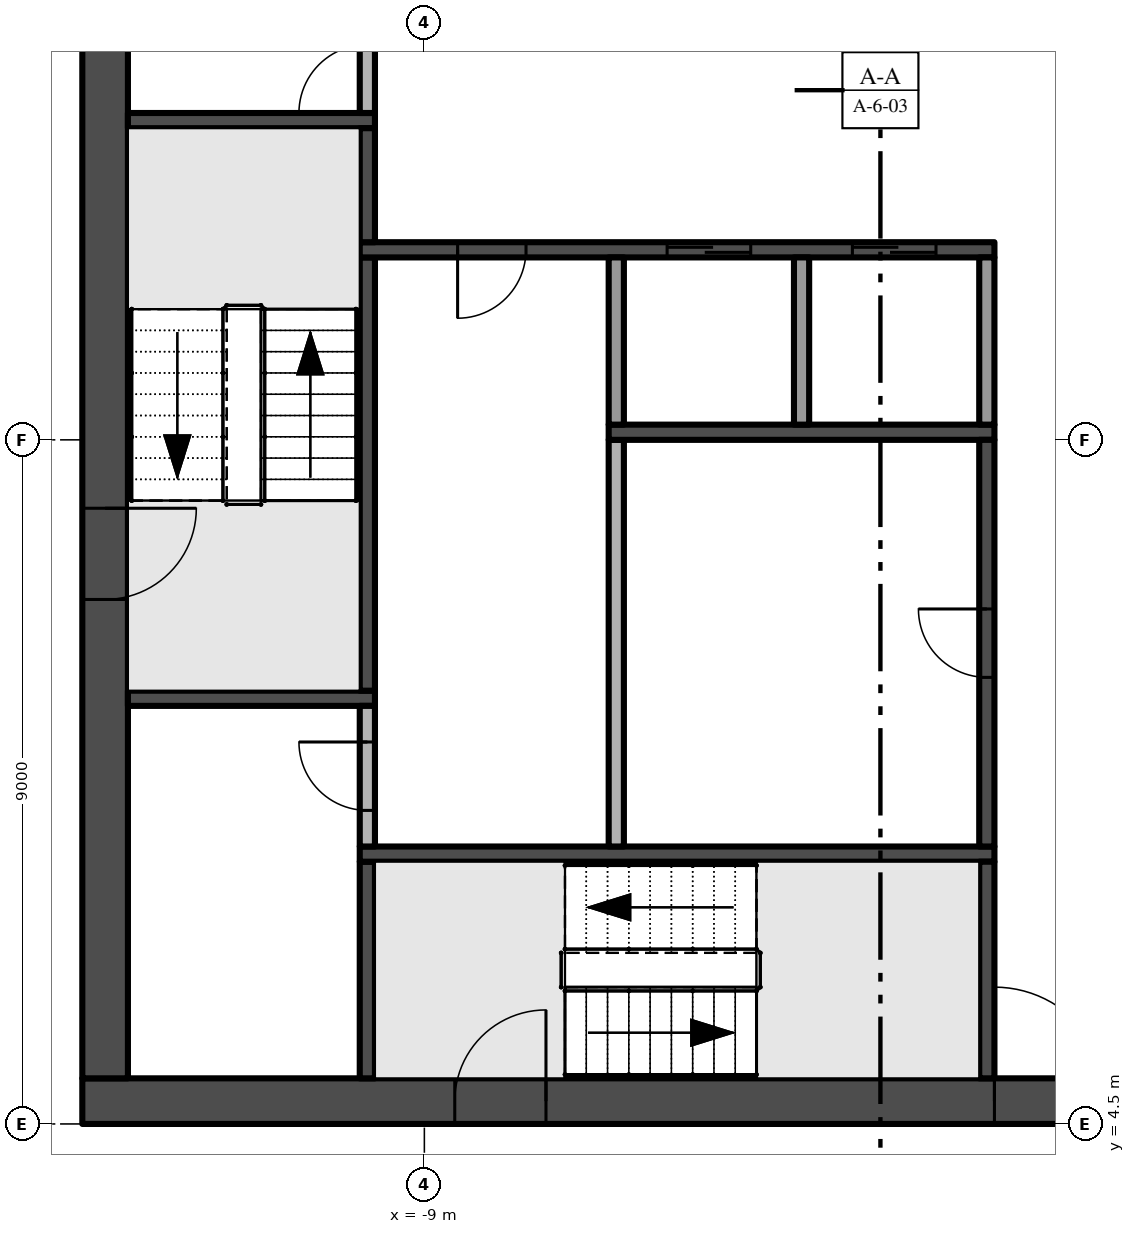
"""IFC4 building model, lengths in metres.
Left out: names, types, materials, properties, quantities, classifications, styles, units other than length and angle.
Written with IfcOpenShell. Run it as: python <this file> out.ifc"""

import sys

from ifc_helpers import new_model, si_unit, direction, frame, frame_2d, origin, place, context, subcontext, project, spatial, rectangle, extrude, element, fill, save


model = new_model("IFC4")
c1 = context("Model", 3, precision=1e-05, world=origin(), true_north=direction((0.0, 1.0)))
c2 = subcontext(c1, "Body", "Model", "MODEL_VIEW")
j1 = project(units=[si_unit("LENGTHUNIT", "METRE"), si_unit("PLANEANGLEUNIT", "RADIAN")], contexts=[c1])
p1 = place(None, origin())
s1 = spatial("IfcSite", under=j1, at=p1, CompositionType="ELEMENT")
p2 = place(p1, origin())
s2 = spatial("IfcBuilding", under=s1, at=p2, CompositionType="ELEMENT")
p3 = place(p2, frame((0.0, 0.0, 297.4)))
s3 = spatial("IfcBuildingStorey", under=s2, at=p3, CompositionType="ELEMENT", Elevation=297.4)
p4 = place(p3, frame((-13.5, 4.8, -0.3), z_axis=(0.0, 0.0, 1.0), x_axis=(1.0, 0.0, 0.0)))
e1 = element("IfcWall", 1, at=p4, inside=s3, PredefinedType="SHEAR", context=c2, shape_type="SweptSolid", body=[
    extrude(rectangle(XDim=27.0, YDim=0.6, at=frame_2d((13.5, 0.0))), origin(), (0.0, 0.0, 1.0), 5.95),
])
p5 = place(p4, frame((12.0, 0.0, 0.3)))
e2 = element("IfcOpeningElement", 2, at=p5, cuts=e1, PredefinedType="OPENING", context=c2, shape_type="SweptSolid", body=[
    extrude(rectangle(XDim=3.0, YDim=2.4, at=frame_2d((1.5, 1.2))), frame((0.0, 0.31, 0.0), z_axis=(0.0, -1.0, 0.0), x_axis=(1.0, 0.0, 0.0)), (0.0, 0.0, 1.0), 0.62),
])
p6 = place(p4, frame((4.9, 0.0, 0.3)))
e3 = element("IfcOpeningElement", 3, at=p6, cuts=e1, PredefinedType="OPENING", context=c2, shape_type="SweptSolid", body=[
    extrude(rectangle(XDim=1.2, YDim=2.2, at=frame_2d((0.6, 1.1))), frame((0.0, 0.31, 0.0), z_axis=(0.0, -1.0, 0.0), x_axis=(1.0, 0.0, 0.0)), (0.0, 0.0, 1.0), 0.62),
])
p7 = place(p4, frame((20.75, 0.0, 0.3)))
e4 = element("IfcOpeningElement", 4, at=p7, cuts=e1, PredefinedType="OPENING", context=c2, shape_type="SweptSolid", body=[
    extrude(rectangle(XDim=1.5, YDim=2.2, at=frame_2d((0.75, 1.1))), frame((0.0, 0.31, 0.0), z_axis=(0.0, -1.0, 0.0), x_axis=(1.0, 0.0, 0.0)), (0.0, 0.0, 1.0), 0.62),
])
p8 = place(p4, frame((17.4, 0.0, 0.3)))
e5 = element("IfcOpeningElement", 5, at=p8, cuts=e1, PredefinedType="OPENING", context=c2, shape_type="SweptSolid", body=[
    extrude(rectangle(XDim=1.2, YDim=2.2, at=frame_2d((0.6, 1.1))), frame((0.0, 0.31, 0.0), z_axis=(0.0, -1.0, 0.0), x_axis=(1.0, 0.0, 0.0)), (0.0, 0.0, 1.0), 0.62),
])
p9 = place(p3, frame((-13.2, 21.9, -0.3), z_axis=(0.0, 0.0, 1.0), x_axis=(0.0, -1.0, 0.0)))
e6 = element("IfcWall", 6, at=p9, inside=s3, PredefinedType="SHEAR", context=c2, shape_type="SweptSolid", body=[
    extrude(rectangle(XDim=16.8, YDim=0.6, at=frame_2d((8.4, 0.0))), origin(), (0.0, 0.0, 1.0), 5.95),
])
p10 = place(p9, frame((9.3, 0.0, 0.3)))
e7 = element("IfcOpeningElement", 7, at=p10, cuts=e6, PredefinedType="OPENING", context=c2, shape_type="SweptSolid", body=[
    extrude(rectangle(XDim=1.2, YDim=2.2, at=frame_2d((0.6, 1.1))), frame((0.0, 0.31, 0.0), z_axis=(0.0, -1.0, 0.0), x_axis=(1.0, 0.0, 0.0)), (0.0, 0.0, 1.0), 0.62),
])
for number, where, z_axis, x_axis in (
    (8, (-12.9, 10.1, 0.0), (0.0, 0.0, 1.0), (1.0, 0.0, 0.0)),
    (9, (-12.9, 17.7, 0.0), (0.0, 0.0, 1.0), (1.0, 0.0, 0.0)),
):
    element("IfcWall", number, at=place(p3, frame(where, z_axis=z_axis, x_axis=x_axis)), inside=s3, PredefinedType="SHEAR", context=c2, shape_type="SweptSolid", body=[
        extrude(rectangle(XDim=3.25, YDim=0.2, at=frame_2d((1.625, 0.0))), origin(), (0.0, 0.0, 1.0), 5.65),
    ])
p11 = place(p3, frame((-9.75, 5.1, 0.0), z_axis=(0.0, 0.0, 1.0), x_axis=(0.0, 1.0, 0.0)))
e10 = element("IfcWall", 10, at=p11, inside=s3, PredefinedType="SHEAR", context=c2, shape_type="SweptSolid", body=[
    extrude(rectangle(XDim=2.85, YDim=0.2, at=frame_2d((1.425, 0.0))), origin(), (0.0, 0.0, 1.0), 5.65),
])
p12 = place(p3, frame((-9.85, 8.05, 0.0), z_axis=(0.0, 0.0, 1.0), x_axis=(1.0, 0.0, 0.0)))
e11 = element("IfcWall", 11, at=p12, inside=s3, PredefinedType="SHEAR", context=c2, shape_type="SweptSolid", body=[
    extrude(rectangle(XDim=8.35, YDim=0.2, at=frame_2d((4.175, 0.0))), origin(), (0.0, 0.0, 1.0), 5.65),
])
p13 = place(p3, frame((-9.75, 8.15, 0.0), z_axis=(0.0, 0.0, 1.0), x_axis=(0.0, 1.0, 0.0)))
e12 = element("IfcWall", 12, at=p13, inside=s3, PredefinedType="PARTITIONING", context=c2, shape_type="SweptSolid", body=[
    extrude(rectangle(XDim=1.85, YDim=0.2, at=frame_2d((0.925, 0.0))), origin(), (0.0, 0.0, 1.0), 5.65),
])
p14 = place(p13, frame((0.475, 0.0, 0.0)))
e13 = element("IfcOpeningElement", 13, at=p14, cuts=e12, PredefinedType="OPENING", context=c2, shape_type="SweptSolid", body=[
    extrude(rectangle(XDim=0.9, YDim=2.1, at=frame_2d((0.45, 1.05))), frame((0.0, 0.11, 0.0), z_axis=(0.0, -1.0, 0.0), x_axis=(1.0, 0.0, 0.0)), (0.0, 0.0, 1.0), 0.22),
])
p15 = place(p3, frame((-9.75, 10.2, 0.0), z_axis=(0.0, 0.0, 1.0), x_axis=(0.0, 1.0, 0.0)))
e14 = element("IfcWall", 14, at=p15, inside=s3, PredefinedType="SHEAR", context=c2, shape_type="SweptSolid", body=[
    extrude(rectangle(XDim=5.7, YDim=0.2, at=frame_2d((2.85, 0.0))), origin(), (0.0, 0.0, 1.0), 5.65),
])
p16 = place(p3, frame((-1.5, 16.0, 0.0), z_axis=(0.0, 0.0, 1.0), x_axis=(-1.0, 0.0, 0.0)))
e15 = element("IfcWall", 15, at=p16, inside=s3, PredefinedType="SHEAR", context=c2, shape_type="SweptSolid", body=[
    extrude(rectangle(XDim=8.35, YDim=0.2, at=frame_2d((4.175, 0.0))), origin(), (0.0, 0.0, 1.0), 5.65),
])
p17 = place(p16, frame((3.206, 0.0, 0.0)))
e16 = element("IfcOpeningElement", 16, at=p17, cuts=e15, PredefinedType="OPENING", context=c2, shape_type="SweptSolid", body=[
    extrude(rectangle(XDim=1.1, YDim=2.1, at=frame_2d((0.55, 1.05))), frame((0.0, 0.11, 0.0), z_axis=(0.0, -1.0, 0.0), x_axis=(1.0, 0.0, 0.0)), (0.0, 0.0, 1.0), 0.22),
])
p18 = place(p16, frame((0.769, 0.0, 0.0)))
e17 = element("IfcOpeningElement", 17, at=p18, cuts=e15, PredefinedType="OPENING", context=c2, shape_type="SweptSolid", body=[
    extrude(rectangle(XDim=1.1, YDim=2.1, at=frame_2d((0.55, 1.05))), frame((0.0, 0.11, 0.0), z_axis=(0.0, -1.0, 0.0), x_axis=(1.0, 0.0, 0.0)), (0.0, 0.0, 1.0), 0.22),
])
p19 = place(p16, frame((6.162, 0.0, 0.0)))
e18 = element("IfcOpeningElement", 18, at=p19, cuts=e15, PredefinedType="OPENING", context=c2, shape_type="SweptSolid", body=[
    extrude(rectangle(XDim=0.9, YDim=2.1, at=frame_2d((0.45, 1.05))), frame((0.0, 0.11, 0.0), z_axis=(0.0, -1.0, 0.0), x_axis=(1.0, 0.0, 0.0)), (0.0, 0.0, 1.0), 0.22),
])
p20 = place(p3, frame((-9.75, 16.1, 0.0), z_axis=(0.0, 0.0, 1.0), x_axis=(0.0, 1.0, 0.0)))
e19 = element("IfcWall", 19, at=p20, inside=s3, PredefinedType="SHEAR", context=c2, shape_type="SweptSolid", body=[
    extrude(rectangle(XDim=1.5, YDim=0.2, at=frame_2d((0.75, 0.0))), origin(), (0.0, 0.0, 1.0), 5.65),
])
p21 = place(p3, frame((-9.75, 17.8, 0.0), z_axis=(0.0, 0.0, 1.0), x_axis=(0.0, 1.0, 0.0)))
e20 = element("IfcWall", 20, at=p21, inside=s3, PredefinedType="PARTITIONING", context=c2, shape_type="SweptSolid", body=[
    extrude(rectangle(XDim=1.4, YDim=0.2, at=frame_2d((0.7, 0.0))), origin(), (0.0, 0.0, 1.0), 5.65),
])
p22 = place(p21, origin())
e21 = element("IfcOpeningElement", 21, at=p22, cuts=e20, PredefinedType="OPENING", context=c2, shape_type="SweptSolid", body=[
    extrude(rectangle(XDim=0.9, YDim=2.1, at=frame_2d((0.45, 1.05))), frame((0.0, 0.11, 0.0), z_axis=(0.0, -1.0, 0.0), x_axis=(1.0, 0.0, 0.0)), (0.0, 0.0, 1.0), 0.22),
])
p23 = place(p3, frame((-6.475, 8.15, 0.0), z_axis=(0.0, 0.0, 1.0), x_axis=(0.0, 1.0, 0.0)))
e22 = element("IfcWall", 22, at=p23, inside=s3, PredefinedType="PARTITIONING", context=c2, shape_type="SweptSolid", body=[
    extrude(rectangle(XDim=5.35, YDim=0.2, at=frame_2d((2.675, 0.0))), origin(), (0.0, 0.0, 1.0), 5.65),
])
p24 = place(p3, frame((-6.575, 13.6, 0.0), z_axis=(0.0, 0.0, 1.0), x_axis=(1.0, 0.0, 0.0)))
e23 = element("IfcWall", 23, at=p24, inside=s3, PredefinedType="SHEAR", context=c2, shape_type="SweptSolid", body=[
    extrude(rectangle(XDim=5.075, YDim=0.2, at=frame_2d((2.538, 0.0))), origin(), (0.0, 0.0, 1.0), 5.65),
])
for number, where, z_axis, x_axis in (
    (24, (-6.475, 13.7, 0.0), (0.0, 0.0, 1.0), (0.0, 1.0, 0.0)),
    (25, (-4.037, 13.7, 0.0), (0.0, 0.0, 1.0), (0.0, 1.0, 0.0)),
):
    element("IfcWall", number, at=place(p3, frame(where, z_axis=z_axis, x_axis=x_axis)), inside=s3, PredefinedType="PARTITIONING", context=c2, shape_type="SweptSolid", body=[
        extrude(rectangle(XDim=2.2, YDim=0.2, at=frame_2d((1.1, 0.0))), origin(), (0.0, 0.0, 1.0), 5.65),
    ])
p25 = place(p3, frame((-1.6, 5.1, 0.0), z_axis=(0.0, 0.0, 1.0), x_axis=(0.0, 1.0, 0.0)))
e26 = element("IfcWall", 26, at=p25, inside=s3, PredefinedType="SHEAR", context=c2, shape_type="SweptSolid", body=[
    extrude(rectangle(XDim=2.85, YDim=0.2, at=frame_2d((1.425, 0.0))), origin(), (0.0, 0.0, 1.0), 5.65),
])
p26 = place(p3, frame((-1.6, 8.15, 0.0), z_axis=(0.0, 0.0, 1.0), x_axis=(0.0, 1.0, 0.0)))
e27 = element("IfcWall", 27, at=p26, inside=s3, PredefinedType="SHEAR", context=c2, shape_type="SweptSolid", body=[
    extrude(rectangle(XDim=5.35, YDim=0.2, at=frame_2d((2.675, 0.0))), origin(), (0.0, 0.0, 1.0), 5.65),
])
p27 = place(p26, frame((2.225, 0.0, 0.0)))
e28 = element("IfcOpeningElement", 28, at=p27, cuts=e27, PredefinedType="OPENING", context=c2, shape_type="SweptSolid", body=[
    extrude(rectangle(XDim=0.9, YDim=2.1, at=frame_2d((0.45, 1.05))), frame((0.0, 0.11, 0.0), z_axis=(0.0, -1.0, 0.0), x_axis=(1.0, 0.0, 0.0)), (0.0, 0.0, 1.0), 0.22),
])
p28 = place(p3, frame((-1.6, 13.7, 0.0), z_axis=(0.0, 0.0, 1.0), x_axis=(0.0, 1.0, 0.0)))
e29 = element("IfcWall", 29, at=p28, inside=s3, PredefinedType="PARTITIONING", context=c2, shape_type="SweptSolid", body=[
    extrude(rectangle(XDim=2.2, YDim=0.2, at=frame_2d((1.1, 0.0))), origin(), (0.0, 0.0, 1.0), 5.65),
])
p29 = place(p5, frame((3.0, 0.0, 0.0), z_axis=(0.0, 0.0, 1.0), x_axis=(-1.0, 0.0, 0.0)))
e30 = element("IfcDoor", 30, at=p29, inside=s3, OperationType="DOUBLE_DOOR_SINGLE_SWING", PredefinedType="DOOR", context=c2, shape_type="SweptSolid", body=[
    extrude(rectangle(XDim=3.0, YDim=2.4, at=frame_2d((1.5, 1.2))), frame((0.0, 0.025, 0.0), z_axis=(0.0, -1.0, 0.0), x_axis=(1.0, 0.0, 0.0)), (0.0, 0.0, 1.0), 0.05),
])
fill(e2, e30)
p30 = place(p10, frame((1.2, 0.0, 0.0), z_axis=(0.0, 0.0, 1.0), x_axis=(-1.0, 0.0, 0.0)))
e31 = element("IfcDoor", 31, at=p30, inside=s3, OperationType="SINGLE_SWING_RIGHT", PredefinedType="DOOR", context=c2, shape_type="SweptSolid", body=[
    extrude(rectangle(XDim=1.2, YDim=2.2, at=frame_2d((0.6, 1.1))), frame((0.0, 0.025, 0.0), z_axis=(0.0, -1.0, 0.0), x_axis=(1.0, 0.0, 0.0)), (0.0, 0.0, 1.0), 0.05),
])
fill(e7, e31)
p31 = place(p6, frame((1.2, 0.0, 0.0), z_axis=(0.0, 0.0, 1.0), x_axis=(-1.0, 0.0, 0.0)))
e32 = element("IfcDoor", 32, at=p31, inside=s3, OperationType="SINGLE_SWING_LEFT", PredefinedType="DOOR", context=c2, shape_type="SweptSolid", body=[
    extrude(rectangle(XDim=1.2, YDim=2.2, at=frame_2d((0.6, 1.1))), frame((0.0, 0.025, 0.0), z_axis=(0.0, -1.0, 0.0), x_axis=(1.0, 0.0, 0.0)), (0.0, 0.0, 1.0), 0.05),
])
fill(e3, e32)
p32 = place(p17, origin())
e33 = element("IfcDoor", 33, at=p32, inside=s3, OperationType="SLIDING_TO_LEFT", PredefinedType="DOOR", context=c2, shape_type="SweptSolid", body=[
    extrude(rectangle(XDim=1.1, YDim=2.1, at=frame_2d((0.55, 1.05))), frame((0.0, 0.025, 0.0), z_axis=(0.0, -1.0, 0.0), x_axis=(1.0, 0.0, 0.0)), (0.0, 0.0, 1.0), 0.05),
])
fill(e16, e33)
p33 = place(p18, origin())
e34 = element("IfcDoor", 34, at=p33, inside=s3, OperationType="SLIDING_TO_LEFT", PredefinedType="DOOR", context=c2, shape_type="SweptSolid", body=[
    extrude(rectangle(XDim=1.1, YDim=2.1, at=frame_2d((0.55, 1.05))), frame((0.0, 0.025, 0.0), z_axis=(0.0, -1.0, 0.0), x_axis=(1.0, 0.0, 0.0)), (0.0, 0.0, 1.0), 0.05),
])
fill(e17, e34)
p34 = place(p19, origin())
e35 = element("IfcDoor", 35, at=p34, inside=s3, OperationType="SINGLE_SWING_RIGHT", PredefinedType="DOOR", context=c2, shape_type="SweptSolid", body=[
    extrude(rectangle(XDim=0.9, YDim=2.1, at=frame_2d((0.45, 1.05))), frame((0.0, 0.025, 0.0), z_axis=(0.0, -1.0, 0.0), x_axis=(1.0, 0.0, 0.0)), (0.0, 0.0, 1.0), 0.05),
])
fill(e18, e35)
p35 = place(p27, origin())
e36 = element("IfcDoor", 36, at=p35, inside=s3, OperationType="SINGLE_SWING_RIGHT", PredefinedType="DOOR", context=c2, shape_type="SweptSolid", body=[
    extrude(rectangle(XDim=0.9, YDim=2.1, at=frame_2d((0.45, 1.05))), frame((0.0, 0.025, 0.0), z_axis=(0.0, -1.0, 0.0), x_axis=(1.0, 0.0, 0.0)), (0.0, 0.0, 1.0), 0.05),
])
fill(e28, e36)
p36 = place(p22, origin())
e37 = element("IfcDoor", 37, at=p36, inside=s3, OperationType="SINGLE_SWING_LEFT", PredefinedType="DOOR", context=c2, shape_type="SweptSolid", body=[
    extrude(rectangle(XDim=0.9, YDim=2.1, at=frame_2d((0.45, 1.05))), frame((0.0, 0.025, 0.0), z_axis=(0.0, -1.0, 0.0), x_axis=(1.0, 0.0, 0.0)), (0.0, 0.0, 1.0), 0.05),
])
fill(e21, e37)
p37 = place(p14, origin())
e38 = element("IfcDoor", 38, at=p37, inside=s3, OperationType="SINGLE_SWING_RIGHT", PredefinedType="DOOR", context=c2, shape_type="SweptSolid", body=[
    extrude(rectangle(XDim=0.9, YDim=2.1, at=frame_2d((0.45, 1.05))), frame((0.0, 0.025, 0.0), z_axis=(0.0, -1.0, 0.0), x_axis=(1.0, 0.0, 0.0)), (0.0, 0.0, 1.0), 0.05),
])
fill(e13, e38)
save(model, sys.argv[1])
